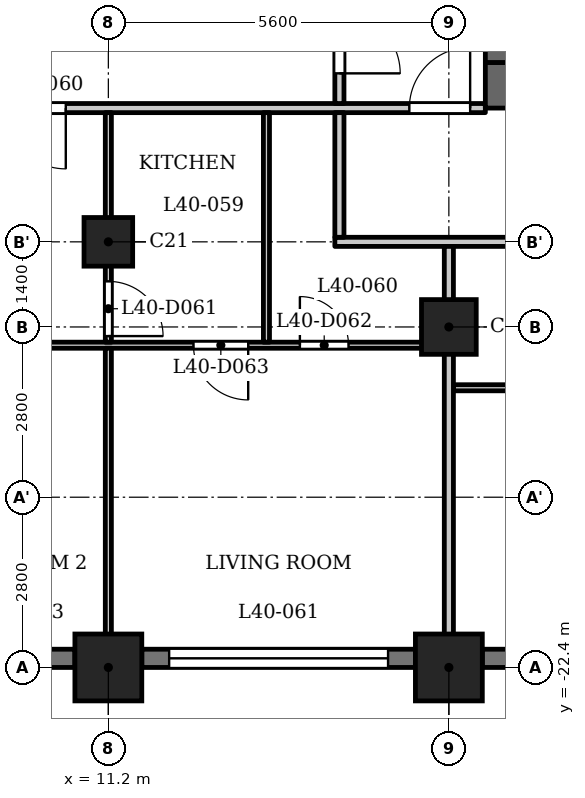
"""IFC4 building model, lengths in metres.
Left out: names, types, materials, properties, quantities, classifications, styles, units other than length and angle.
Written with IfcOpenShell. Run it as: python <this file> out.ifc"""

import sys

from ifc_helpers import new_model, si_unit, direction, frame, frame_2d, origin, origin_2d, place, context, subcontext, project, spatial, rectangle, extrude, element, fill, save


model = new_model("IFC4")
c1 = context("Model", 3, precision=1e-05, world=origin(), true_north=direction((0.0, 1.0)))
c2 = subcontext(c1, "Body", "Model", "MODEL_VIEW")
j1 = project(units=[si_unit("LENGTHUNIT", "METRE"), si_unit("PLANEANGLEUNIT", "RADIAN")], contexts=[c1])
p1 = place(None, origin())
s1 = spatial("IfcSite", under=j1, at=p1, CompositionType="ELEMENT")
p2 = place(p1, origin())
s2 = spatial("IfcBuilding", under=s1, at=p2, CompositionType="ELEMENT")
p3 = place(p2, frame((0.0, 0.0, 157.1)))
s3 = spatial("IfcBuildingStorey", under=s2, at=p3, CompositionType="ELEMENT", Elevation=157.1)
for number, where, z_axis, x_axis in (
    (1, (11.2, -22.4, 0.0), (0.0, 0.0, 1.0), (1.0, 0.0, 0.0)),
    (2, (16.8, -22.4, 0.0), (0.0, 0.0, 1.0), (1.0, 0.0, 0.0)),
):
    element("IfcColumn", number, at=place(p3, frame(where, z_axis=z_axis, x_axis=x_axis)), inside=s3, PredefinedType="COLUMN", context=c2, shape_type="SweptSolid", body=[
        extrude(rectangle(XDim=1.1, YDim=1.1, at=origin_2d()), origin(), (0.0, 0.0, 1.0), 3.5),
    ])
p4 = place(p3, frame((16.8, -16.8, 0.0), z_axis=(0.0, 0.0, 1.0), x_axis=(1.0, 0.0, 0.0)))
e3 = element("IfcColumn", 3, at=p4, inside=s3, PredefinedType="COLUMN", context=c2, shape_type="SweptSolid", body=[
    extrude(rectangle(XDim=0.9, YDim=0.9, at=origin_2d()), origin(), (0.0, 0.0, 1.0), 3.5),
])
p5 = place(p3, frame((11.2, -15.4, 0.0), z_axis=(0.0, 0.0, 1.0), x_axis=(1.0, 0.0, 0.0)))
e4 = element("IfcColumn", 4, at=p5, inside=s3, PredefinedType="COLUMN", context=c2, shape_type="SweptSolid", body=[
    extrude(rectangle(XDim=0.8, YDim=0.8, at=origin_2d()), origin(), (0.0, 0.0, 1.0), 3.5),
])
p6 = place(p3, frame((6.15, -22.25, 0.0), z_axis=(0.0, 0.0, 1.0), x_axis=(1.0, 0.0, 0.0)))
e5 = element("IfcWall", 5, at=p6, inside=s3, PredefinedType="SOLIDWALL", context=c2, shape_type="SweptSolid", body=[
    extrude(rectangle(XDim=4.5, YDim=0.3, at=frame_2d((2.25, 0.0))), origin(), (0.0, 0.0, 1.0), 2.45),
])
p7 = place(p6, frame((0.488, 0.0, 0.6)))
e6 = element("IfcOpeningElement", 6, at=p7, cuts=e5, PredefinedType="OPENING", context=c2, shape_type="SweptSolid", body=[
    extrude(rectangle(XDim=1.2, YDim=1.55, at=frame_2d((0.6, 0.775))), frame((0.0, 0.16, 0.0), z_axis=(0.0, -1.0, 0.0), x_axis=(1.0, 0.0, 0.0)), (0.0, 0.0, 1.0), 0.32),
])
p8 = place(p6, frame((2.812, 0.0, 0.6)))
e7 = element("IfcOpeningElement", 7, at=p8, cuts=e5, PredefinedType="OPENING", context=c2, shape_type="SweptSolid", body=[
    extrude(rectangle(XDim=1.2, YDim=1.55, at=frame_2d((0.6, 0.775))), frame((0.0, 0.16, 0.0), z_axis=(0.0, -1.0, 0.0), x_axis=(1.0, 0.0, 0.0)), (0.0, 0.0, 1.0), 0.32),
])
p9 = place(p3, frame((11.75, -22.25, 0.0), z_axis=(0.0, 0.0, 1.0), x_axis=(1.0, 0.0, 0.0)))
e8 = element("IfcWall", 8, at=p9, inside=s3, PredefinedType="SOLIDWALL", context=c2, shape_type="SweptSolid", body=[
    extrude(rectangle(XDim=4.5, YDim=0.3, at=frame_2d((2.25, 0.0))), origin(), (0.0, 0.0, 1.0), 2.45),
])
p10 = place(p9, frame((0.45, 0.0, 1.2)))
e9 = element("IfcOpeningElement", 9, at=p10, cuts=e8, PredefinedType="OPENING", context=c2, shape_type="SweptSolid", body=[
    extrude(rectangle(XDim=3.6, YDim=0.95, at=frame_2d((1.8, 0.475))), frame((0.0, 0.16, 0.0), z_axis=(0.0, -1.0, 0.0), x_axis=(1.0, 0.0, 0.0)), (0.0, 0.0, 1.0), 0.32),
])
p11 = place(p3, frame((17.35, -22.25, 0.0), z_axis=(0.0, 0.0, 1.0), x_axis=(1.0, 0.0, 0.0)))
e10 = element("IfcWall", 10, at=p11, inside=s3, PredefinedType="SOLIDWALL", context=c2, shape_type="SweptSolid", body=[
    extrude(rectangle(XDim=2.65, YDim=0.3, at=frame_2d((1.325, 0.0))), origin(), (0.0, 0.0, 1.0), 2.45),
])
p12 = place(p11, frame((0.425, 0.0, 0.9)))
e11 = element("IfcOpeningElement", 11, at=p12, cuts=e10, PredefinedType="OPENING", context=c2, shape_type="SweptSolid", body=[
    extrude(rectangle(XDim=1.8, YDim=1.25, at=frame_2d((0.9, 0.625))), frame((0.0, 0.16, 0.0), z_axis=(0.0, -1.0, 0.0), x_axis=(1.0, 0.0, 0.0)), (0.0, 0.0, 1.0), 0.32),
])
p13 = place(p3, frame((17.4, -12.825, 0.0), z_axis=(0.0, 0.0, 1.0), x_axis=(1.0, 0.0, 0.0)))
e12 = element("IfcWall", 12, at=p13, inside=s3, PredefinedType="SHEAR", context=c2, shape_type="SweptSolid", body=[
    extrude(rectangle(XDim=10.4, YDim=0.75, at=frame_2d((5.2, 0.0))), origin(), (0.0, 0.0, 1.0), 3.2),
])
p14 = place(p3, frame((17.6, -12.45, 0.0), z_axis=(0.0, 0.0, 1.0), x_axis=(0.0, 1.0, 0.0)))
e13 = element("IfcWall", 13, at=p14, inside=s3, PredefinedType="SHEAR", context=c2, shape_type="SweptSolid", body=[
    extrude(rectangle(XDim=24.9, YDim=0.4, at=frame_2d((12.45, 0.0))), origin(), (0.0, 0.0, 1.0), 3.2),
])
p15 = place(p14, frame((8.65, 0.0, 0.0)))
e14 = element("IfcOpeningElement", 14, at=p15, cuts=e13, PredefinedType="OPENING", context=c2, shape_type="SweptSolid", body=[
    extrude(rectangle(XDim=0.9, YDim=2.1, at=frame_2d((0.45, 1.05))), frame((0.0, 0.21, 0.0), z_axis=(0.0, -1.0, 0.0), x_axis=(1.0, 0.0, 0.0)), (0.0, 0.0, 1.0), 0.42),
])
p16 = place(p14, frame((15.6, 0.0, 0.0)))
e15 = element("IfcOpeningElement", 15, at=p16, cuts=e13, PredefinedType="OPENING", context=c2, shape_type="SweptSolid", body=[
    extrude(rectangle(XDim=1.1, YDim=2.1, at=frame_2d((0.55, 1.05))), frame((0.0, 0.21, 0.0), z_axis=(0.0, -1.0, 0.0), x_axis=(1.0, 0.0, 0.0)), (0.0, 0.0, 1.0), 0.42),
])
p17 = place(p14, frame((18.0, 0.0, 0.0)))
e16 = element("IfcOpeningElement", 16, at=p17, cuts=e13, PredefinedType="OPENING", context=c2, shape_type="SweptSolid", body=[
    extrude(rectangle(XDim=1.1, YDim=2.1, at=frame_2d((0.55, 1.05))), frame((0.0, 0.21, 0.0), z_axis=(0.0, -1.0, 0.0), x_axis=(1.0, 0.0, 0.0)), (0.0, 0.0, 1.0), 0.42),
])
p18 = place(p14, frame((23.025, 0.0, 0.0)))
e17 = element("IfcOpeningElement", 17, at=p18, cuts=e13, PredefinedType="OPENING", context=c2, shape_type="SweptSolid", body=[
    extrude(rectangle(XDim=1.1, YDim=2.1, at=frame_2d((0.55, 1.05))), frame((0.0, 0.21, 0.0), z_axis=(0.0, -1.0, 0.0), x_axis=(1.0, 0.0, 0.0)), (0.0, 0.0, 1.0), 0.42),
])
p19 = place(p14, frame((0.775, 0.0, 0.0)))
e18 = element("IfcOpeningElement", 18, at=p19, cuts=e13, PredefinedType="OPENING", context=c2, shape_type="SweptSolid", body=[
    extrude(rectangle(XDim=1.1, YDim=2.1, at=frame_2d((0.55, 1.05))), frame((0.0, 0.21, 0.0), z_axis=(0.0, -1.0, 0.0), x_axis=(1.0, 0.0, 0.0)), (0.0, 0.0, 1.0), 0.42),
])
p20 = place(p14, frame((12.925, 0.0, 0.0)))
e19 = element("IfcOpeningElement", 19, at=p20, cuts=e13, PredefinedType="OPENING", context=c2, shape_type="SweptSolid", body=[
    extrude(rectangle(XDim=1.8, YDim=2.1, at=frame_2d((0.9, 1.05))), frame((0.0, 0.21, 0.0), z_axis=(0.0, -1.0, 0.0), x_axis=(1.0, 0.0, 0.0)), (0.0, 0.0, 1.0), 0.42),
])
p21 = place(p3, frame((16.875, -17.8, 0.0), z_axis=(0.0, 0.0, 1.0), x_axis=(1.0, 0.0, 0.0)))
e20 = element("IfcWall", 20, at=p21, inside=s3, PredefinedType="PARTITIONING", context=c2, shape_type="SweptSolid", body=[
    extrude(rectangle(XDim=9.519, YDim=0.1, at=frame_2d((4.76, 0.0))), origin(), (0.0, 0.0, 1.0), 3.2),
])
p22 = place(p21, frame((7.843, 0.0, 0.0)))
e21 = element("IfcOpeningElement", 21, at=p22, cuts=e20, PredefinedType="OPENING", context=c2, shape_type="SweptSolid", body=[
    extrude(rectangle(XDim=0.8, YDim=2.1, at=frame_2d((0.4, 1.05))), frame((0.0, 0.06, 0.0), z_axis=(0.0, -1.0, 0.0), x_axis=(1.0, 0.0, 0.0)), (0.0, 0.0, 1.0), 0.12),
])
p23 = place(p21, frame((2.825, 0.0, 0.0)))
e22 = element("IfcOpeningElement", 22, at=p23, cuts=e20, PredefinedType="OPENING", context=c2, shape_type="SweptSolid", body=[
    extrude(rectangle(XDim=0.9, YDim=2.1, at=frame_2d((0.45, 1.05))), frame((0.0, 0.06, 0.0), z_axis=(0.0, -1.0, 0.0), x_axis=(1.0, 0.0, 0.0)), (0.0, 0.0, 1.0), 0.12),
])
p24 = place(p3, frame((-16.725, -17.1, 0.0), z_axis=(0.0, 0.0, 1.0), x_axis=(1.0, 0.0, 0.0)))
e23 = element("IfcWall", 23, at=p24, inside=s3, PredefinedType="PARTITIONING", context=c2, shape_type="SweptSolid", body=[
    extrude(rectangle(XDim=33.45, YDim=0.1, at=frame_2d((16.725, 0.0))), origin(), (0.0, 0.0, 1.0), 3.2),
])
p25 = place(p24, frame((0.725, 0.0, 0.0)))
e24 = element("IfcOpeningElement", 24, at=p25, cuts=e23, PredefinedType="OPENING", context=c2, shape_type="SweptSolid", body=[
    extrude(rectangle(XDim=0.8, YDim=2.1, at=frame_2d((0.4, 1.05))), frame((0.0, 0.06, 0.0), z_axis=(0.0, -1.0, 0.0), x_axis=(1.0, 0.0, 0.0)), (0.0, 0.0, 1.0), 0.12),
])
p26 = place(p24, frame((3.175, 0.0, 0.0)))
e25 = element("IfcOpeningElement", 25, at=p26, cuts=e23, PredefinedType="OPENING", context=c2, shape_type="SweptSolid", body=[
    extrude(rectangle(XDim=0.9, YDim=2.1, at=frame_2d((0.45, 1.05))), frame((0.0, 0.06, 0.0), z_axis=(0.0, -1.0, 0.0), x_axis=(1.0, 0.0, 0.0)), (0.0, 0.0, 1.0), 0.12),
])
p27 = place(p24, frame((6.075, 0.0, 0.0)))
e26 = element("IfcOpeningElement", 26, at=p27, cuts=e23, PredefinedType="OPENING", context=c2, shape_type="SweptSolid", body=[
    extrude(rectangle(XDim=0.8, YDim=2.1, at=frame_2d((0.4, 1.05))), frame((0.0, 0.06, 0.0), z_axis=(0.0, -1.0, 0.0), x_axis=(1.0, 0.0, 0.0)), (0.0, 0.0, 1.0), 0.12),
])
p28 = place(p24, frame((9.425, 0.0, 0.0)))
e27 = element("IfcOpeningElement", 27, at=p28, cuts=e23, PredefinedType="OPENING", context=c2, shape_type="SweptSolid", body=[
    extrude(rectangle(XDim=0.9, YDim=2.1, at=frame_2d((0.45, 1.05))), frame((0.0, 0.06, 0.0), z_axis=(0.0, -1.0, 0.0), x_axis=(1.0, 0.0, 0.0)), (0.0, 0.0, 1.0), 0.12),
])
p29 = place(p24, frame((12.675, 0.0, 0.0)))
e28 = element("IfcOpeningElement", 28, at=p29, cuts=e23, PredefinedType="OPENING", context=c2, shape_type="SweptSolid", body=[
    extrude(rectangle(XDim=0.8, YDim=2.1, at=frame_2d((0.4, 1.05))), frame((0.0, 0.06, 0.0), z_axis=(0.0, -1.0, 0.0), x_axis=(1.0, 0.0, 0.0)), (0.0, 0.0, 1.0), 0.12),
])
p30 = place(p24, frame((15.275, 0.0, 0.0)))
e29 = element("IfcOpeningElement", 29, at=p30, cuts=e23, PredefinedType="OPENING", context=c2, shape_type="SweptSolid", body=[
    extrude(rectangle(XDim=0.9, YDim=2.1, at=frame_2d((0.45, 1.05))), frame((0.0, 0.06, 0.0), z_axis=(0.0, -1.0, 0.0), x_axis=(1.0, 0.0, 0.0)), (0.0, 0.0, 1.0), 0.12),
])
p31 = place(p24, frame((20.625, 0.0, 0.0)))
e30 = element("IfcOpeningElement", 30, at=p31, cuts=e23, PredefinedType="OPENING", context=c2, shape_type="SweptSolid", body=[
    extrude(rectangle(XDim=0.8, YDim=2.1, at=frame_2d((0.4, 1.05))), frame((0.0, 0.06, 0.0), z_axis=(0.0, -1.0, 0.0), x_axis=(1.0, 0.0, 0.0)), (0.0, 0.0, 1.0), 0.12),
])
p32 = place(p24, frame((17.375, 0.0, 0.0)))
e31 = element("IfcOpeningElement", 31, at=p32, cuts=e23, PredefinedType="OPENING", context=c2, shape_type="SweptSolid", body=[
    extrude(rectangle(XDim=0.9, YDim=2.1, at=frame_2d((0.45, 1.05))), frame((0.0, 0.06, 0.0), z_axis=(0.0, -1.0, 0.0), x_axis=(1.0, 0.0, 0.0)), (0.0, 0.0, 1.0), 0.12),
])
p33 = place(p24, frame((31.075, 0.0, 0.0)))
e32 = element("IfcOpeningElement", 32, at=p33, cuts=e23, PredefinedType="OPENING", context=c2, shape_type="SweptSolid", body=[
    extrude(rectangle(XDim=0.8, YDim=2.1, at=frame_2d((0.4, 1.05))), frame((0.0, 0.06, 0.0), z_axis=(0.0, -1.0, 0.0), x_axis=(1.0, 0.0, 0.0)), (0.0, 0.0, 1.0), 0.12),
])
p34 = place(p24, frame((29.325, 0.0, 0.0)))
e33 = element("IfcOpeningElement", 33, at=p34, cuts=e23, PredefinedType="OPENING", context=c2, shape_type="SweptSolid", body=[
    extrude(rectangle(XDim=0.9, YDim=2.1, at=frame_2d((0.45, 1.05))), frame((0.0, 0.06, 0.0), z_axis=(0.0, -1.0, 0.0), x_axis=(1.0, 0.0, 0.0)), (0.0, 0.0, 1.0), 0.12),
])
p35 = place(p24, frame((23.725, 0.0, 0.0)))
e34 = element("IfcOpeningElement", 34, at=p35, cuts=e23, PredefinedType="OPENING", context=c2, shape_type="SweptSolid", body=[
    extrude(rectangle(XDim=0.9, YDim=2.1, at=frame_2d((0.45, 1.05))), frame((0.0, 0.06, 0.0), z_axis=(0.0, -1.0, 0.0), x_axis=(1.0, 0.0, 0.0)), (0.0, 0.0, 1.0), 0.12),
])
p36 = place(p24, frame((25.775, 0.0, 0.0)))
e35 = element("IfcOpeningElement", 35, at=p36, cuts=e23, PredefinedType="OPENING", context=c2, shape_type="SweptSolid", body=[
    extrude(rectangle(XDim=0.9, YDim=2.1, at=frame_2d((0.45, 1.05))), frame((0.0, 0.06, 0.0), z_axis=(0.0, -1.0, 0.0), x_axis=(1.0, 0.0, 0.0)), (0.0, 0.0, 1.0), 0.12),
])
p37 = place(p3, frame((14.925, -15.4, 0.0), z_axis=(0.0, 0.0, 1.0), x_axis=(1.0, 0.0, 0.0)))
e36 = element("IfcWall", 36, at=p37, inside=s3, PredefinedType="PARTITIONING", context=c2, shape_type="SweptSolid", body=[
    extrude(rectangle(XDim=12.559, YDim=0.15, at=frame_2d((6.279, 0.0))), origin(), (0.0, 0.0, 1.0), 3.2),
])
p38 = place(p37, frame((5.775, 0.0, 0.0)))
e37 = element("IfcOpeningElement", 37, at=p38, cuts=e36, PredefinedType="OPENING", context=c2, shape_type="SweptSolid", body=[
    extrude(rectangle(XDim=1.0, YDim=2.1, at=frame_2d((0.5, 1.05))), frame((0.0, 0.085, 0.0), z_axis=(0.0, -1.0, 0.0), x_axis=(1.0, 0.0, 0.0)), (0.0, 0.0, 1.0), 0.17),
])
p39 = place(p3, frame((-17.4, -13.2, 0.0), z_axis=(0.0, 0.0, 1.0), x_axis=(1.0, 0.0, 0.0)))
e38 = element("IfcWall", 38, at=p39, inside=s3, PredefinedType="PARTITIONING", context=c2, shape_type="SweptSolid", body=[
    extrude(rectangle(XDim=34.8, YDim=0.15, at=frame_2d((17.4, 0.0))), origin(), (0.0, 0.0, 1.0), 3.2),
])
p40 = place(p39, frame((0.15, 0.0, 0.0)))
e39 = element("IfcOpeningElement", 39, at=p40, cuts=e38, PredefinedType="OPENING", context=c2, shape_type="SweptSolid", body=[
    extrude(rectangle(XDim=1.0, YDim=2.1, at=frame_2d((0.5, 1.05))), frame((0.0, 0.085, 0.0), z_axis=(0.0, -1.0, 0.0), x_axis=(1.0, 0.0, 0.0)), (0.0, 0.0, 1.0), 0.17),
])
p41 = place(p39, frame((33.55, 0.0, 0.0)))
e40 = element("IfcOpeningElement", 40, at=p41, cuts=e38, PredefinedType="OPENING", context=c2, shape_type="SweptSolid", body=[
    extrude(rectangle(XDim=1.0, YDim=2.1, at=frame_2d((0.5, 1.05))), frame((0.0, 0.085, 0.0), z_axis=(0.0, -1.0, 0.0), x_axis=(1.0, 0.0, 0.0)), (0.0, 0.0, 1.0), 0.17),
])
p42 = place(p39, frame((3.5, 0.0, 0.0)))
e41 = element("IfcOpeningElement", 41, at=p42, cuts=e38, PredefinedType="OPENING", context=c2, shape_type="SweptSolid", body=[
    extrude(rectangle(XDim=1.0, YDim=2.1, at=frame_2d((0.5, 1.05))), frame((0.0, 0.085, 0.0), z_axis=(0.0, -1.0, 0.0), x_axis=(1.0, 0.0, 0.0)), (0.0, 0.0, 1.0), 0.17),
])
p43 = place(p39, frame((10.1, 0.0, 0.0)))
e42 = element("IfcOpeningElement", 42, at=p43, cuts=e38, PredefinedType="OPENING", context=c2, shape_type="SweptSolid", body=[
    extrude(rectangle(XDim=1.0, YDim=2.1, at=frame_2d((0.5, 1.05))), frame((0.0, 0.085, 0.0), z_axis=(0.0, -1.0, 0.0), x_axis=(1.0, 0.0, 0.0)), (0.0, 0.0, 1.0), 0.17),
])
p44 = place(p39, frame((15.7, 0.0, 0.0)))
e43 = element("IfcOpeningElement", 43, at=p44, cuts=e38, PredefinedType="OPENING", context=c2, shape_type="SweptSolid", body=[
    extrude(rectangle(XDim=1.0, YDim=2.1, at=frame_2d((0.5, 1.05))), frame((0.0, 0.085, 0.0), z_axis=(0.0, -1.0, 0.0), x_axis=(1.0, 0.0, 0.0)), (0.0, 0.0, 1.0), 0.17),
])
p45 = place(p39, frame((18.05, 0.0, 0.0)))
e44 = element("IfcOpeningElement", 44, at=p45, cuts=e38, PredefinedType="OPENING", context=c2, shape_type="SweptSolid", body=[
    extrude(rectangle(XDim=1.0, YDim=2.1, at=frame_2d((0.5, 1.05))), frame((0.0, 0.085, 0.0), z_axis=(0.0, -1.0, 0.0), x_axis=(1.0, 0.0, 0.0)), (0.0, 0.0, 1.0), 0.17),
])
p46 = place(p39, frame((26.9, 0.0, 0.0)))
e45 = element("IfcOpeningElement", 45, at=p46, cuts=e38, PredefinedType="OPENING", context=c2, shape_type="SweptSolid", body=[
    extrude(rectangle(XDim=1.0, YDim=2.1, at=frame_2d((0.5, 1.05))), frame((0.0, 0.085, 0.0), z_axis=(0.0, -1.0, 0.0), x_axis=(1.0, 0.0, 0.0)), (0.0, 0.0, 1.0), 0.17),
])
p47 = place(p3, frame((11.2, -22.93, 0.0), z_axis=(0.0, 0.0, 1.0), x_axis=(0.0, 1.0, 0.0)))
e46 = element("IfcWall", 46, at=p47, inside=s3, PredefinedType="PARTITIONING", context=c2, shape_type="SweptSolid", body=[
    extrude(rectangle(XDim=5.78, YDim=0.1, at=frame_2d((2.89, 0.0))), origin(), (0.0, 0.0, 1.0), 3.2),
])
p48 = place(p3, frame((11.2, -17.05, 0.0), z_axis=(0.0, 0.0, 1.0), x_axis=(0.0, 1.0, 0.0)))
e47 = element("IfcWall", 47, at=p48, inside=s3, PredefinedType="PARTITIONING", context=c2, shape_type="SweptSolid", body=[
    extrude(rectangle(XDim=3.775, YDim=0.1, at=frame_2d((1.888, 0.0))), origin(), (0.0, 0.0, 1.0), 3.2),
])
p49 = place(p48, frame((0.1, 0.0, 0.0)))
e48 = element("IfcOpeningElement", 48, at=p49, cuts=e47, PredefinedType="OPENING", context=c2, shape_type="SweptSolid", body=[
    extrude(rectangle(XDim=0.9, YDim=2.1, at=frame_2d((0.45, 1.05))), frame((0.0, 0.06, 0.0), z_axis=(0.0, -1.0, 0.0), x_axis=(1.0, 0.0, 0.0)), (0.0, 0.0, 1.0), 0.12),
])
p50 = place(p3, frame((13.8, -17.05, 0.0), z_axis=(0.0, 0.0, 1.0), x_axis=(0.0, 1.0, 0.0)))
e49 = element("IfcWall", 49, at=p50, inside=s3, PredefinedType="PARTITIONING", context=c2, shape_type="SweptSolid", body=[
    extrude(rectangle(XDim=3.775, YDim=0.1, at=frame_2d((1.888, 0.0))), origin(), (0.0, 0.0, 1.0), 3.2),
])
p51 = place(p3, frame((15.0, -15.325, 0.0), z_axis=(0.0, 0.0, 1.0), x_axis=(0.0, 1.0, 0.0)))
e50 = element("IfcWall", 50, at=p51, inside=s3, PredefinedType="PARTITIONING", context=c2, shape_type="SweptSolid", body=[
    extrude(rectangle(XDim=2.05, YDim=0.15, at=frame_2d((1.025, 0.0))), origin(), (0.0, 0.0, 1.0), 3.2),
])
p52 = place(p3, frame((15.0, -13.125, 0.0), z_axis=(0.0, 0.0, 1.0), x_axis=(0.0, 1.0, 0.0)))
e51 = element("IfcWall", 51, at=p52, inside=s3, PredefinedType="PARTITIONING", context=c2, shape_type="SweptSolid", body=[
    extrude(rectangle(XDim=6.356, YDim=0.15, at=frame_2d((3.178, 0.0))), origin(), (0.0, 0.0, 1.0), 3.2),
])
p53 = place(p52, frame((0.496, 0.0, 0.0)))
e52 = element("IfcOpeningElement", 52, at=p53, cuts=e51, PredefinedType="OPENING", context=c2, shape_type="SweptSolid", body=[
    extrude(rectangle(XDim=1.0, YDim=2.1, at=frame_2d((0.5, 1.05))), frame((0.0, 0.085, 0.0), z_axis=(0.0, -1.0, 0.0), x_axis=(1.0, 0.0, 0.0)), (0.0, 0.0, 1.0), 0.17),
])
p54 = place(p3, frame((16.8, -22.93, 0.0), z_axis=(0.0, 0.0, 1.0), x_axis=(0.0, 1.0, 0.0)))
e53 = element("IfcWall", 53, at=p54, inside=s3, PredefinedType="PARTITIONING", context=c2, shape_type="SweptSolid", body=[
    extrude(rectangle(XDim=7.455, YDim=0.15, at=frame_2d((3.728, 0.0))), origin(), (0.0, 0.0, 1.0), 3.2),
])
p55 = place(p53, origin())
e54 = element("IfcDoor", 54, at=p55, inside=s3, OperationType="SINGLE_SWING_LEFT", PredefinedType="DOOR", context=c2, shape_type="SweptSolid", body=[
    extrude(rectangle(XDim=1.0, YDim=2.1, at=frame_2d((0.5, 1.05))), frame((0.0, 0.025, 0.0), z_axis=(0.0, -1.0, 0.0), x_axis=(1.0, 0.0, 0.0)), (0.0, 0.0, 1.0), 0.05),
])
fill(e52, e54)
p56 = place(p41, origin())
e55 = element("IfcDoor", 55, at=p56, inside=s3, OperationType="SINGLE_SWING_LEFT", PredefinedType="DOOR", context=c2, shape_type="SweptSolid", body=[
    extrude(rectangle(XDim=1.0, YDim=2.1, at=frame_2d((0.5, 1.05))), frame((0.0, 0.025, 0.0), z_axis=(0.0, -1.0, 0.0), x_axis=(1.0, 0.0, 0.0)), (0.0, 0.0, 1.0), 0.05),
])
fill(e40, e55)
p57 = place(p46, origin())
e56 = element("IfcDoor", 56, at=p57, inside=s3, OperationType="SINGLE_SWING_RIGHT", PredefinedType="DOOR", context=c2, shape_type="SweptSolid", body=[
    extrude(rectangle(XDim=1.0, YDim=2.1, at=frame_2d((0.5, 1.05))), frame((0.0, 0.025, 0.0), z_axis=(0.0, -1.0, 0.0), x_axis=(1.0, 0.0, 0.0)), (0.0, 0.0, 1.0), 0.05),
])
fill(e45, e56)
p58 = place(p49, origin())
e57 = element("IfcDoor", 57, at=p58, inside=s3, OperationType="SINGLE_SWING_LEFT", PredefinedType="DOOR", context=c2, shape_type="SweptSolid", body=[
    extrude(rectangle(XDim=0.9, YDim=2.1, at=frame_2d((0.45, 1.05))), frame((0.0, 0.025, 0.0), z_axis=(0.0, -1.0, 0.0), x_axis=(1.0, 0.0, 0.0)), (0.0, 0.0, 1.0), 0.05),
])
fill(e48, e57)
p59 = place(p33, origin())
e58 = element("IfcDoor", 58, at=p59, inside=s3, OperationType="SINGLE_SWING_RIGHT", PredefinedType="DOOR", context=c2, shape_type="SweptSolid", body=[
    extrude(rectangle(XDim=0.8, YDim=2.1, at=frame_2d((0.4, 1.05))), frame((0.0, 0.025, 0.0), z_axis=(0.0, -1.0, 0.0), x_axis=(1.0, 0.0, 0.0)), (0.0, 0.0, 1.0), 0.05),
])
fill(e32, e58)
p60 = place(p34, origin())
e59 = element("IfcDoor", 59, at=p60, inside=s3, OperationType="SINGLE_SWING_RIGHT", PredefinedType="DOOR", context=c2, shape_type="SweptSolid", body=[
    extrude(rectangle(XDim=0.9, YDim=2.1, at=frame_2d((0.45, 1.05))), frame((0.0, 0.025, 0.0), z_axis=(0.0, -1.0, 0.0), x_axis=(1.0, 0.0, 0.0)), (0.0, 0.0, 1.0), 0.05),
])
fill(e33, e59)
p61 = place(p10, origin())
e60 = element("IfcWindow", 60, at=p61, inside=s3, PartitioningType="SINGLE_PANEL", PredefinedType="WINDOW", context=c2, shape_type="SweptSolid", body=[
    extrude(rectangle(XDim=3.6, YDim=0.95, at=frame_2d((1.8, 0.475))), frame((0.0, 0.03, 0.0), z_axis=(0.0, -1.0, 0.0), x_axis=(1.0, 0.0, 0.0)), (0.0, 0.0, 1.0), 0.06),
])
fill(e9, e60)
save(model, sys.argv[1])
